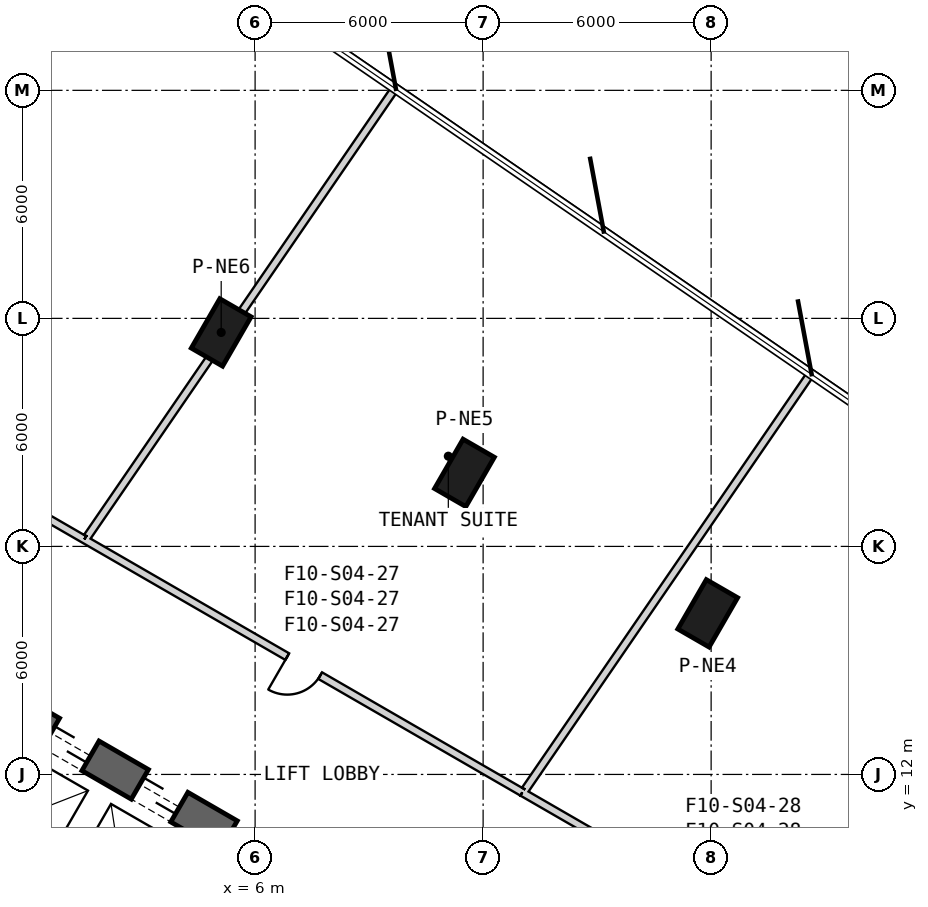
"""IFC4 building model, lengths in metres.
Left out: names, types, materials, properties, quantities, classifications, styles, units other than length and angle.
Written with IfcOpenShell. Run it as: python <this file> out.ifc"""

import sys

from ifc_helpers import new_model, si_unit, direction, frame, frame_2d, origin, origin_2d, place, context, subcontext, project, spatial, rectangle, extrude, element, fill, save


model = new_model("IFC4")
c1 = context("Model", 3, precision=1e-05, world=origin(), true_north=direction((0.0, 1.0)))
c2 = subcontext(c1, "Body", "Model", "MODEL_VIEW")
j1 = project(units=[si_unit("LENGTHUNIT", "METRE"), si_unit("PLANEANGLEUNIT", "RADIAN")], contexts=[c1])
p1 = place(None, origin())
s1 = spatial("IfcSite", under=j1, at=p1, CompositionType="ELEMENT")
p2 = place(p1, origin())
s2 = spatial("IfcBuilding", under=s1, at=p2, CompositionType="ELEMENT")
p3 = place(p2, frame((0.0, 0.0, 94.7)))
s3 = spatial("IfcBuildingStorey", under=s2, at=p3, CompositionType="ELEMENT", Elevation=94.7)
for number, where, z_axis, x_axis in (
    (1, (17.91, 16.238, 0.0), (0.0, 0.0, 1.0), (0.5, 0.866, 0.0)),
    (2, (11.509, 19.934, 0.0), (0.0, 0.0, 1.0), (0.5, 0.866, 0.0)),
    (3, (5.108, 23.63, 0.0), (0.0, 0.0, 1.0), (0.5, 0.866, 0.0)),
):
    element("IfcColumn", number, at=place(p3, frame(where, z_axis=z_axis, x_axis=x_axis)), inside=s3, PredefinedType="COLUMN", context=c2, shape_type="SweptSolid", body=[
        extrude(rectangle(XDim=1.5, YDim=0.95, at=origin_2d()), origin(), (0.0, 0.0, 1.0), 4.1),
    ])
p4 = place(p3, frame((19.475, 2.208, 0.0), z_axis=(0.0, 0.0, 1.0), x_axis=(-0.866028369851, 0.499994862586, 0.0)))
e4 = element("IfcWall", 4, at=p4, inside=s3, PredefinedType="SHEAR", context=c2, shape_type="SweptSolid", body=[
    extrude(rectangle(XDim=31.523, YDim=0.9, at=frame_2d((15.762, 0.0))), origin(), (0.0, 0.0, 1.0), 4.1),
])
p5 = place(p4, frame((7.062, 0.0, 0.0)))
e5 = element("IfcOpeningElement", 5, at=p5, cuts=e4, PredefinedType="OPENING", context=c2, shape_type="SweptSolid", body=[
    extrude(rectangle(XDim=1.2, YDim=2.4, at=frame_2d((0.6, 1.2))), frame((0.0, 0.46, 0.0), z_axis=(0.0, -1.0, 0.0), x_axis=(1.0, 0.0, 0.0)), (0.0, 0.0, 1.0), 0.92),
])
p6 = place(p4, frame((9.762, 0.0, 0.0)))
e6 = element("IfcOpeningElement", 6, at=p6, cuts=e4, PredefinedType="OPENING", context=c2, shape_type="SweptSolid", body=[
    extrude(rectangle(XDim=1.2, YDim=2.4, at=frame_2d((0.6, 1.2))), frame((0.0, 0.46, 0.0), z_axis=(0.0, -1.0, 0.0), x_axis=(1.0, 0.0, 0.0)), (0.0, 0.0, 1.0), 0.92),
])
p7 = place(p4, frame((12.462, 0.0, 0.0)))
e7 = element("IfcOpeningElement", 7, at=p7, cuts=e4, PredefinedType="OPENING", context=c2, shape_type="SweptSolid", body=[
    extrude(rectangle(XDim=1.2, YDim=2.4, at=frame_2d((0.6, 1.2))), frame((0.0, 0.46, 0.0), z_axis=(0.0, -1.0, 0.0), x_axis=(1.0, 0.0, 0.0)), (0.0, 0.0, 1.0), 0.92),
])
p8 = place(p4, frame((15.162, 0.0, 0.0)))
e8 = element("IfcOpeningElement", 8, at=p8, cuts=e4, PredefinedType="OPENING", context=c2, shape_type="SweptSolid", body=[
    extrude(rectangle(XDim=1.2, YDim=2.4, at=frame_2d((0.6, 1.2))), frame((0.0, 0.46, 0.0), z_axis=(0.0, -1.0, 0.0), x_axis=(1.0, 0.0, 0.0)), (0.0, 0.0, 1.0), 0.92),
])
p9 = place(p4, frame((17.862, 0.0, 0.0)))
e9 = element("IfcOpeningElement", 9, at=p9, cuts=e4, PredefinedType="OPENING", context=c2, shape_type="SweptSolid", body=[
    extrude(rectangle(XDim=1.2, YDim=2.4, at=frame_2d((0.6, 1.2))), frame((0.0, 0.46, 0.0), z_axis=(0.0, -1.0, 0.0), x_axis=(1.0, 0.0, 0.0)), (0.0, 0.0, 1.0), 0.92),
])
p10 = place(p4, frame((20.562, 0.0, 0.0)))
e10 = element("IfcOpeningElement", 10, at=p10, cuts=e4, PredefinedType="OPENING", context=c2, shape_type="SweptSolid", body=[
    extrude(rectangle(XDim=1.2, YDim=2.4, at=frame_2d((0.6, 1.2))), frame((0.0, 0.46, 0.0), z_axis=(0.0, -1.0, 0.0), x_axis=(1.0, 0.0, 0.0)), (0.0, 0.0, 1.0), 0.92),
])
p11 = place(p4, frame((23.262, 0.0, 0.0)))
e11 = element("IfcOpeningElement", 11, at=p11, cuts=e4, PredefinedType="OPENING", context=c2, shape_type="SweptSolid", body=[
    extrude(rectangle(XDim=1.2, YDim=2.4, at=frame_2d((0.6, 1.2))), frame((0.0, 0.46, 0.0), z_axis=(0.0, -1.0, 0.0), x_axis=(1.0, 0.0, 0.0)), (0.0, 0.0, 1.0), 0.92),
])
p12 = place(p4, frame((3.612, 0.0, 0.0)))
e12 = element("IfcOpeningElement", 12, at=p12, cuts=e4, PredefinedType="OPENING", context=c2, shape_type="SweptSolid", body=[
    extrude(rectangle(XDim=1.2, YDim=2.4, at=frame_2d((0.6, 1.2))), frame((0.0, 0.46, 0.0), z_axis=(0.0, -1.0, 0.0), x_axis=(1.0, 0.0, 0.0)), (0.0, 0.0, 1.0), 0.92),
])
p13 = place(p4, frame((26.712, 0.0, 0.0)))
e13 = element("IfcOpeningElement", 13, at=p13, cuts=e4, PredefinedType="OPENING", context=c2, shape_type="SweptSolid", body=[
    extrude(rectangle(XDim=1.2, YDim=2.4, at=frame_2d((0.6, 1.2))), frame((0.0, 0.46, 0.0), z_axis=(0.0, -1.0, 0.0), x_axis=(1.0, 0.0, 0.0)), (0.0, 0.0, 1.0), 0.92),
])
p14 = place(p3, frame((22.727, 5.931, 0.0), z_axis=(0.0, 0.0, 1.0), x_axis=(-0.866021821949, 0.50000620387, 0.0)))
e14 = element("IfcWall", 14, at=p14, inside=s3, PredefinedType="PARTITIONING", context=c2, shape_type="SweptSolid", body=[
    extrude(rectangle(XDim=11.197, YDim=0.2, at=frame_2d((5.598, 0.0))), origin(), (0.0, 0.0, 1.0), 2.98),
])
p15 = place(p14, frame((5.136, 0.0, 0.0)))
e15 = element("IfcOpeningElement", 15, at=p15, cuts=e14, PredefinedType="OPENING", context=c2, shape_type="SweptSolid", body=[
    extrude(rectangle(XDim=1.0, YDim=2.1, at=frame_2d((0.5, 1.05))), frame((0.0, 0.11, 0.0), z_axis=(0.0, -1.0, 0.0), x_axis=(1.0, 0.0, 0.0)), (0.0, 0.0, 1.0), 0.22),
])
p16 = place(p3, frame((13.031, 11.529, 0.0), z_axis=(0.0, 0.0, 1.0), x_axis=(-0.866023969537, 0.500002484181, 0.0)))
e16 = element("IfcWall", 16, at=p16, inside=s3, PredefinedType="PARTITIONING", context=c2, shape_type="SweptSolid", body=[
    extrude(rectangle(XDim=13.308, YDim=0.2, at=frame_2d((6.654, 0.0))), origin(), (0.0, 0.0, 1.0), 3.08),
])
p17 = place(p16, frame((6.142, 0.0, 0.0)))
e17 = element("IfcOpeningElement", 17, at=p17, cuts=e16, PredefinedType="OPENING", context=c2, shape_type="SweptSolid", body=[
    extrude(rectangle(XDim=1.0, YDim=2.1, at=frame_2d((0.5, 1.05))), frame((0.0, 0.11, 0.0), z_axis=(0.0, -1.0, 0.0), x_axis=(1.0, 0.0, 0.0)), (0.0, 0.0, 1.0), 0.22),
])
p18 = place(p3, frame((1.506, 18.183, 0.0), z_axis=(0.0, 0.0, 1.0), x_axis=(-0.866028170149, 0.499995208485, 0.0)))
e18 = element("IfcWall", 18, at=p18, inside=s3, PredefinedType="PARTITIONING", context=c2, shape_type="SweptSolid", body=[
    extrude(rectangle(XDim=8.729, YDim=0.2, at=frame_2d((4.365, 0.0))), origin(), (0.0, 0.0, 1.0), 2.98),
])
p19 = place(p18, frame((3.865, 0.0, 0.0)))
e19 = element("IfcOpeningElement", 19, at=p19, cuts=e18, PredefinedType="OPENING", context=c2, shape_type="SweptSolid", body=[
    extrude(rectangle(XDim=1.0, YDim=2.1, at=frame_2d((0.5, 1.05))), frame((0.0, 0.11, 0.0), z_axis=(0.0, -1.0, 0.0), x_axis=(1.0, 0.0, 0.0)), (0.0, 0.0, 1.0), 0.22),
])
p20 = place(p3, frame((1.584, 18.254, 0.0), z_axis=(0.0, 0.0, 1.0), x_axis=(0.565874790915, 0.824491189163, 0.0)))
e20 = element("IfcWall", 20, at=p20, inside=s3, PredefinedType="PARTITIONING", context=c2, shape_type="SweptSolid", body=[
    extrude(rectangle(XDim=14.31, YDim=0.2, at=frame_2d((7.155, 0.0))), origin(), (0.0, 0.0, 1.0), 3.08),
])
p21 = place(p3, frame((20.62, 22.544, 0.0), z_axis=(0.0, 0.0, 1.0), x_axis=(-0.565893246877, -0.824478521939, 0.0)))
e21 = element("IfcWall", 21, at=p21, inside=s3, PredefinedType="PARTITIONING", context=c2, shape_type="SweptSolid", body=[
    extrude(rectangle(XDim=13.274, YDim=0.2, at=frame_2d((6.637, 0.0))), origin(), (0.0, 0.0, 1.0), 3.08),
])
p22 = place(p17, origin())
e22 = element("IfcDoor", 22, at=p22, inside=s3, OperationType="SINGLE_SWING_LEFT", PredefinedType="USERDEFINED", context=c2, shape_type="SweptSolid", body=[
    extrude(rectangle(XDim=1.0, YDim=2.1, at=frame_2d((0.5, 1.05))), frame((0.0, 0.025, 0.0), z_axis=(0.0, -1.0, 0.0), x_axis=(1.0, 0.0, 0.0)), (0.0, 0.0, 1.0), 0.05),
])
fill(e17, e22)
p23 = place(p9, origin())
e23 = element("IfcDoor", 23, at=p23, inside=s3, OperationType="SLIDING_TO_LEFT", PredefinedType="USERDEFINED", context=c2, shape_type="SweptSolid", body=[
    extrude(rectangle(XDim=1.2, YDim=2.4, at=frame_2d((0.6, 1.2))), frame((0.0, 0.025, 0.0), z_axis=(0.0, -1.0, 0.0), x_axis=(1.0, 0.0, 0.0)), (0.0, 0.0, 1.0), 0.05),
])
fill(e9, e23)
p24 = place(p10, origin())
e24 = element("IfcDoor", 24, at=p24, inside=s3, OperationType="SLIDING_TO_LEFT", PredefinedType="USERDEFINED", context=c2, shape_type="SweptSolid", body=[
    extrude(rectangle(XDim=1.2, YDim=2.4, at=frame_2d((0.6, 1.2))), frame((0.0, 0.025, 0.0), z_axis=(0.0, -1.0, 0.0), x_axis=(1.0, 0.0, 0.0)), (0.0, 0.0, 1.0), 0.05),
])
fill(e10, e24)
save(model, sys.argv[1])
